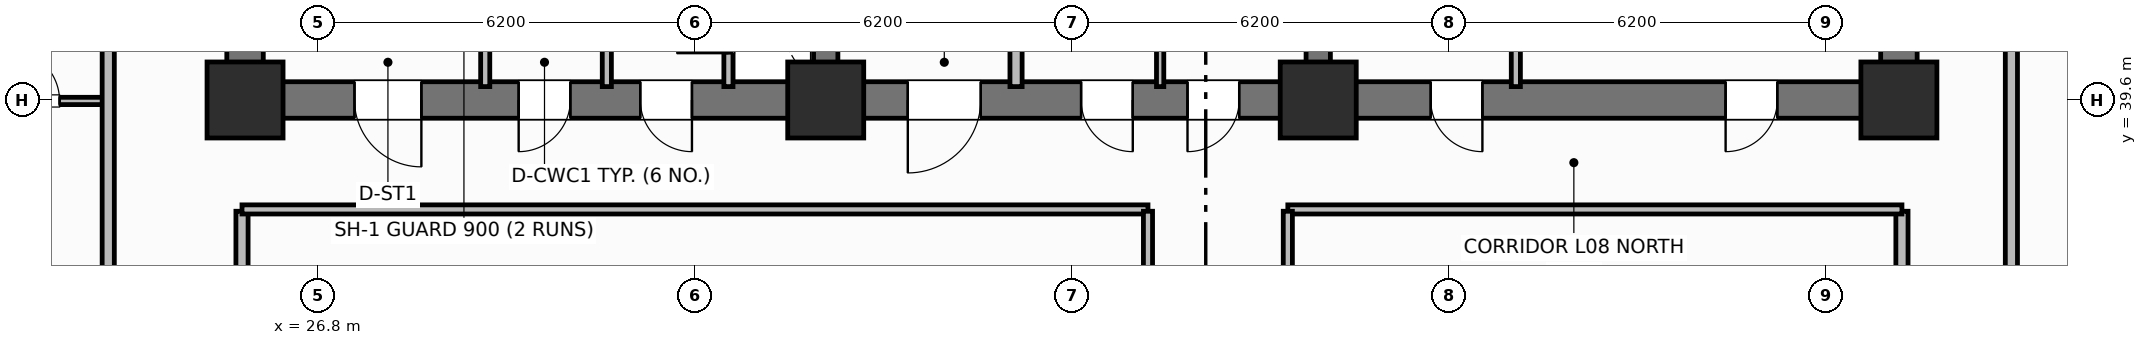
"""IFC4 building model, lengths in metres.
Left out: names, types, materials, properties, quantities, classifications, styles, units other than length and angle.
Written with IfcOpenShell. Run it as: python <this file> out.ifc"""

import sys

from ifc_helpers import new_model, si_unit, direction, frame, frame_2d, origin, origin_2d, place, context, subcontext, project, spatial, rectangle, extrude, element, fill, save


model = new_model("IFC4")
c1 = context("Model", 3, precision=1e-05, world=origin(), true_north=direction((0.0, 1.0)))
c2 = subcontext(c1, "Body", "Model", "MODEL_VIEW")
j1 = project(units=[si_unit("LENGTHUNIT", "METRE"), si_unit("PLANEANGLEUNIT", "RADIAN")], contexts=[c1])
p1 = place(None, origin())
s1 = spatial("IfcSite", under=j1, at=p1, CompositionType="ELEMENT")
p2 = place(p1, origin())
s2 = spatial("IfcBuilding", under=s1, at=p2, CompositionType="ELEMENT")
p3 = place(p2, frame((0.0, 0.0, 36.2)))
s3 = spatial("IfcBuildingStorey", under=s2, at=p3, CompositionType="ELEMENT", Elevation=36.2)
for number, where, z_axis, x_axis in (
    (1, (25.6, 39.9, 0.0), (0.0, 0.0, 1.0), (0.0, 1.0, 0.0)),
    (2, (52.8, 39.9, 0.0), (0.0, 0.0, 1.0), (0.0, 1.0, 0.0)),
):
    element("IfcWall", number, at=place(p3, frame(where, z_axis=z_axis, x_axis=x_axis)), inside=s3, PredefinedType="SHEAR", context=c2, shape_type="SweptSolid", body=[
        extrude(rectangle(XDim=5.6, YDim=0.6, at=frame_2d((2.8, 0.0))), origin(), (0.0, 0.0, 1.0), 3.7),
    ])
p4 = place(p3, frame((52.8, 39.6, 0.0), z_axis=(0.0, 0.0, 1.0), x_axis=(-1.0, 0.0, 0.0)))
e3 = element("IfcWall", 3, at=p4, inside=s3, PredefinedType="SHEAR", context=c2, shape_type="SweptSolid", body=[
    extrude(rectangle(XDim=27.2, YDim=0.6, at=frame_2d((13.6, 0.0))), origin(), (0.0, 0.0, 1.0), 3.7),
])
p5 = place(p4, frame((24.3, 0.0, 0.0)))
e4 = element("IfcOpeningElement", 4, at=p5, cuts=e3, PredefinedType="OPENING", context=c2, shape_type="SweptSolid", body=[
    extrude(rectangle(XDim=1.1, YDim=2.15, at=frame_2d((0.55, 1.075))), frame((0.0, 0.31, 0.0), z_axis=(0.0, -1.0, 0.0), x_axis=(1.0, 0.0, 0.0)), (0.0, 0.0, 1.0), 0.62),
])
p6 = place(p4, frame((21.85, 0.0, 0.0)))
e5 = element("IfcOpeningElement", 5, at=p6, cuts=e3, PredefinedType="OPENING", context=c2, shape_type="SweptSolid", body=[
    extrude(rectangle(XDim=0.85, YDim=2.1, at=frame_2d((0.425, 1.05))), frame((0.0, 0.31, 0.0), z_axis=(0.0, -1.0, 0.0), x_axis=(1.0, 0.0, 0.0)), (0.0, 0.0, 1.0), 0.62),
])
p7 = place(p4, frame((19.85, 0.0, 0.0)))
e6 = element("IfcOpeningElement", 6, at=p7, cuts=e3, PredefinedType="OPENING", context=c2, shape_type="SweptSolid", body=[
    extrude(rectangle(XDim=0.85, YDim=2.1, at=frame_2d((0.425, 1.05))), frame((0.0, 0.31, 0.0), z_axis=(0.0, -1.0, 0.0), x_axis=(1.0, 0.0, 0.0)), (0.0, 0.0, 1.0), 0.62),
])
p8 = place(p4, frame((15.1, 0.0, 0.0)))
e7 = element("IfcOpeningElement", 7, at=p8, cuts=e3, PredefinedType="OPENING", context=c2, shape_type="SweptSolid", body=[
    extrude(rectangle(XDim=1.2, YDim=2.15, at=frame_2d((0.6, 1.075))), frame((0.0, 0.31, 0.0), z_axis=(0.0, -1.0, 0.0), x_axis=(1.0, 0.0, 0.0)), (0.0, 0.0, 1.0), 0.62),
])
p9 = place(p4, frame((12.6, 0.0, 0.0)))
e8 = element("IfcOpeningElement", 8, at=p9, cuts=e3, PredefinedType="OPENING", context=c2, shape_type="SweptSolid", body=[
    extrude(rectangle(XDim=0.85, YDim=2.1, at=frame_2d((0.425, 1.05))), frame((0.0, 0.31, 0.0), z_axis=(0.0, -1.0, 0.0), x_axis=(1.0, 0.0, 0.0)), (0.0, 0.0, 1.0), 0.62),
])
p10 = place(p4, frame((10.85, 0.0, 0.0)))
e9 = element("IfcOpeningElement", 9, at=p10, cuts=e3, PredefinedType="OPENING", context=c2, shape_type="SweptSolid", body=[
    extrude(rectangle(XDim=0.85, YDim=2.1, at=frame_2d((0.425, 1.05))), frame((0.0, 0.31, 0.0), z_axis=(0.0, -1.0, 0.0), x_axis=(1.0, 0.0, 0.0)), (0.0, 0.0, 1.0), 0.62),
])
p11 = place(p4, frame((6.85, 0.0, 0.0)))
e10 = element("IfcOpeningElement", 10, at=p11, cuts=e3, PredefinedType="OPENING", context=c2, shape_type="SweptSolid", body=[
    extrude(rectangle(XDim=0.85, YDim=2.1, at=frame_2d((0.425, 1.05))), frame((0.0, 0.31, 0.0), z_axis=(0.0, -1.0, 0.0), x_axis=(1.0, 0.0, 0.0)), (0.0, 0.0, 1.0), 0.62),
])
p12 = place(p4, frame((2.0, 0.0, 0.0)))
e11 = element("IfcOpeningElement", 11, at=p12, cuts=e3, PredefinedType="OPENING", context=c2, shape_type="SweptSolid", body=[
    extrude(rectangle(XDim=0.85, YDim=2.1, at=frame_2d((0.425, 1.05))), frame((0.0, 0.31, 0.0), z_axis=(0.0, -1.0, 0.0), x_axis=(1.0, 0.0, 0.0)), (0.0, 0.0, 1.0), 0.62),
])
for number, where, z_axis, x_axis in (
    (12, (35.15, 39.9, 0.0), (0.0, 0.0, 1.0), (0.0, 1.0, 0.0)),
    (13, (43.25, 39.9, 0.0), (0.0, 0.0, 1.0), (0.0, 1.0, 0.0)),
):
    element("IfcWall", number, at=place(p3, frame(where, z_axis=z_axis, x_axis=x_axis)), inside=s3, PredefinedType="SHEAR", context=c2, shape_type="SweptSolid", body=[
        extrude(rectangle(XDim=5.6, YDim=0.4, at=frame_2d((2.8, 0.0))), origin(), (0.0, 0.0, 1.0), 3.7),
    ])
for number, where, z_axis, x_axis in (
    (14, (25.6, 39.6, 0.0), (0.0, 0.0, 1.0), (1.0, 0.0, 0.0)),
    (15, (35.15, 39.6, 0.0), (0.0, 0.0, 1.0), (1.0, 0.0, 0.0)),
    (16, (43.25, 39.6, 0.0), (0.0, 0.0, 1.0), (1.0, 0.0, 0.0)),
    (17, (52.8, 39.6, 0.0), (0.0, 0.0, 1.0), (1.0, 0.0, 0.0)),
):
    element("IfcColumn", number, at=place(p3, frame(where, z_axis=z_axis, x_axis=x_axis)), inside=s3, PredefinedType="COLUMN", context=c2, shape_type="SweptSolid", body=[
        extrude(rectangle(XDim=1.25, YDim=1.25, at=origin_2d()), origin(), (0.0, 0.0, 1.0), 3.7),
    ])
p13 = place(p3, frame((33.55, 39.82, 0.0), z_axis=(0.0, 0.0, 1.0), x_axis=(0.0, 1.0, 0.0)))
e18 = element("IfcWall", 18, at=p13, inside=s3, PredefinedType="PARTITIONING", context=c2, shape_type="SweptSolid", body=[
    extrude(rectangle(XDim=2.13, YDim=0.15, at=frame_2d((1.065, 0.0))), origin(), (0.0, 0.0, 1.0), 2.53),
])
p14 = place(p13, frame((0.55, 0.0, 0.0)))
e19 = element("IfcOpeningElement", 19, at=p14, cuts=e18, PredefinedType="OPENING", context=c2, shape_type="SweptSolid", body=[
    extrude(rectangle(XDim=0.85, YDim=2.05, at=frame_2d((0.425, 1.025))), frame((0.0, 0.085, 0.0), z_axis=(0.0, -1.0, 0.0), x_axis=(1.0, 0.0, 0.0)), (0.0, 0.0, 1.0), 0.17),
])
for number, where, z_axis, x_axis in (
    (20, (29.55, 39.82, 0.0), (0.0, 0.0, 1.0), (0.0, 1.0, 0.0)),
    (21, (31.55, 39.82, 0.0), (0.0, 0.0, 1.0), (0.0, 1.0, 0.0)),
):
    element("IfcWall", number, at=place(p3, frame(where, z_axis=z_axis, x_axis=x_axis)), inside=s3, PredefinedType="PARTITIONING", context=c2, shape_type="SweptSolid", body=[
        extrude(rectangle(XDim=2.13, YDim=0.15, at=frame_2d((1.065, 0.0))), origin(), (0.0, 0.0, 1.0), 2.53),
    ])
p15 = place(p3, frame((38.28, 39.82, 0.0), z_axis=(0.0, 0.0, 1.0), x_axis=(0.0, 1.0, 0.0)))
e22 = element("IfcWall", 22, at=p15, inside=s3, PredefinedType="PARTITIONING", context=c2, shape_type="SweptSolid", body=[
    extrude(rectangle(XDim=2.73, YDim=0.2, at=frame_2d((1.365, 0.0))), origin(), (0.0, 0.0, 1.0), 2.53),
])
p16 = place(p3, frame((40.65, 39.82, 0.0), z_axis=(0.0, 0.0, 1.0), x_axis=(0.0, 1.0, 0.0)))
e23 = element("IfcWall", 23, at=p16, inside=s3, PredefinedType="PARTITIONING", context=c2, shape_type="SweptSolid", body=[
    extrude(rectangle(XDim=2.73, YDim=0.12, at=frame_2d((1.365, 0.0))), origin(), (0.0, 0.0, 1.0), 2.53),
])
p17 = place(p3, frame((46.5, 39.82, 0.0), z_axis=(0.0, 0.0, 1.0), x_axis=(0.0, 1.0, 0.0)))
e24 = element("IfcWall", 24, at=p17, inside=s3, PredefinedType="PARTITIONING", context=c2, shape_type="SweptSolid", body=[
    extrude(rectangle(XDim=2.73, YDim=0.15, at=frame_2d((1.365, 0.0))), origin(), (0.0, 0.0, 1.0), 2.53),
])
for number, where, z_axis, x_axis in (
    (25, (25.55, 18.63, 0.0), (0.0, 0.0, 1.0), (0.0, 1.0, 0.0)),
    (26, (52.85, 18.63, 0.0), (0.0, 0.0, 1.0), (0.0, 1.0, 0.0)),
):
    element("IfcWall", number, at=place(p3, frame(where, z_axis=z_axis, x_axis=x_axis)), inside=s3, PredefinedType="PARTITIONING", context=c2, shape_type="SweptSolid", body=[
        extrude(rectangle(XDim=19.14, YDim=0.2, at=frame_2d((9.57, 0.0))), origin(), (0.0, 0.0, 1.0), 2.53),
    ])
p18 = place(p3, frame((25.55, 37.8, 0.0), z_axis=(0.0, 0.0, 1.0), x_axis=(1.0, 0.0, 0.0)))
e27 = element("IfcWall", 27, at=p18, inside=s3, PredefinedType="PARTITIONING", context=c2, shape_type="SweptSolid", body=[
    extrude(rectangle(XDim=14.9, YDim=0.15, at=frame_2d((7.45, 0.0))), origin(), (0.0, 0.0, 1.0), 2.53),
])
p19 = place(p3, frame((42.75, 37.8, 0.0), z_axis=(0.0, 0.0, 1.0), x_axis=(1.0, 0.0, 0.0)))
e28 = element("IfcWall", 28, at=p19, inside=s3, PredefinedType="PARTITIONING", context=c2, shape_type="SweptSolid", body=[
    extrude(rectangle(XDim=10.1, YDim=0.15, at=frame_2d((5.05, 0.0))), origin(), (0.0, 0.0, 1.0), 2.53),
])
p20 = place(p3, frame((40.45, 18.63, 0.0), z_axis=(0.0, 0.0, 1.0), x_axis=(0.0, 1.0, 0.0)))
e29 = element("IfcWall", 29, at=p20, inside=s3, PredefinedType="PARTITIONING", context=c2, shape_type="SweptSolid", body=[
    extrude(rectangle(XDim=19.14, YDim=0.15, at=frame_2d((9.57, 0.0))), origin(), (0.0, 0.0, 1.0), 2.53),
])
p21 = place(p20, frame((2.4, 0.0, 0.0)))
e30 = element("IfcOpeningElement", 30, at=p21, cuts=e29, PredefinedType="OPENING", context=c2, shape_type="SweptSolid", body=[
    extrude(rectangle(XDim=1.0, YDim=2.15, at=frame_2d((0.5, 1.075))), frame((0.0, 0.085, 0.0), z_axis=(0.0, -1.0, 0.0), x_axis=(1.0, 0.0, 0.0)), (0.0, 0.0, 1.0), 0.17),
])
p22 = place(p20, frame((11.4, 0.0, 0.0)))
e31 = element("IfcOpeningElement", 31, at=p22, cuts=e29, PredefinedType="OPENING", context=c2, shape_type="SweptSolid", body=[
    extrude(rectangle(XDim=1.0, YDim=2.15, at=frame_2d((0.5, 1.075))), frame((0.0, 0.085, 0.0), z_axis=(0.0, -1.0, 0.0), x_axis=(1.0, 0.0, 0.0)), (0.0, 0.0, 1.0), 0.17),
])
p23 = place(p3, frame((42.75, 18.63, 0.0), z_axis=(0.0, 0.0, 1.0), x_axis=(0.0, 1.0, 0.0)))
e32 = element("IfcWall", 32, at=p23, inside=s3, PredefinedType="PARTITIONING", context=c2, shape_type="SweptSolid", body=[
    extrude(rectangle(XDim=19.14, YDim=0.15, at=frame_2d((9.57, 0.0))), origin(), (0.0, 0.0, 1.0), 2.53),
])
p24 = place(p23, frame((5.5, 0.0, 0.0)))
e33 = element("IfcOpeningElement", 33, at=p24, cuts=e32, PredefinedType="OPENING", context=c2, shape_type="SweptSolid", body=[
    extrude(rectangle(XDim=1.0, YDim=2.15, at=frame_2d((0.5, 1.075))), frame((0.0, 0.085, 0.0), z_axis=(0.0, -1.0, 0.0), x_axis=(1.0, 0.0, 0.0)), (0.0, 0.0, 1.0), 0.17),
])
p25 = place(p3, frame((21.1, 39.584, 0.0), z_axis=(0.0, 0.0, 1.0), x_axis=(1.0, 0.0, 0.0)))
e34 = element("IfcWall", 34, at=p25, inside=s3, PredefinedType="PARTITIONING", context=c2, shape_type="SweptSolid", body=[
    extrude(rectangle(XDim=2.25, YDim=0.12, at=frame_2d((1.125, 0.0))), origin(), (0.0, 0.0, 1.0), 2.53),
])
p26 = place(p25, frame((0.6, 0.0, 0.0)))
e35 = element("IfcOpeningElement", 35, at=p26, cuts=e34, PredefinedType="OPENING", context=c2, shape_type="SweptSolid", body=[
    extrude(rectangle(XDim=0.85, YDim=2.1, at=frame_2d((0.425, 1.05))), frame((0.0, 0.07, 0.0), z_axis=(0.0, -1.0, 0.0), x_axis=(1.0, 0.0, 0.0)), (0.0, 0.0, 1.0), 0.14),
])
p27 = place(p3, frame((23.35, 10.6, 0.0), z_axis=(0.0, 0.0, 1.0), x_axis=(0.0, 1.0, 0.0)))
e36 = element("IfcWall", 36, at=p27, inside=s3, PredefinedType="PARTITIONING", context=c2, shape_type="SweptSolid", body=[
    extrude(rectangle(XDim=35.2, YDim=0.2, at=frame_2d((17.6, 0.0))), origin(), (0.0, 0.0, 1.0), 2.53),
])
p28 = place(p27, frame((2.65, 0.0, 0.0)))
e37 = element("IfcOpeningElement", 37, at=p28, cuts=e36, PredefinedType="OPENING", context=c2, shape_type="SweptSolid", body=[
    extrude(rectangle(XDim=1.0, YDim=2.15, at=frame_2d((0.5, 1.075))), frame((0.0, 0.11, 0.0), z_axis=(0.0, -1.0, 0.0), x_axis=(1.0, 0.0, 0.0)), (0.0, 0.0, 1.0), 0.22),
])
p29 = place(p27, frame((12.65, 0.0, 0.0)))
e38 = element("IfcOpeningElement", 38, at=p29, cuts=e36, PredefinedType="OPENING", context=c2, shape_type="SweptSolid", body=[
    extrude(rectangle(XDim=1.0, YDim=2.15, at=frame_2d((0.5, 1.075))), frame((0.0, 0.11, 0.0), z_axis=(0.0, -1.0, 0.0), x_axis=(1.0, 0.0, 0.0)), (0.0, 0.0, 1.0), 0.22),
])
p30 = place(p27, frame((24.134, 0.0, 0.0)))
e39 = element("IfcOpeningElement", 39, at=p30, cuts=e36, PredefinedType="OPENING", context=c2, shape_type="SweptSolid", body=[
    extrude(rectangle(XDim=1.0, YDim=2.15, at=frame_2d((0.5, 1.075))), frame((0.0, 0.11, 0.0), z_axis=(0.0, -1.0, 0.0), x_axis=(1.0, 0.0, 0.0)), (0.0, 0.0, 1.0), 0.22),
])
p31 = place(p3, frame((54.65, 10.6, 0.0), z_axis=(0.0, 0.0, 1.0), x_axis=(0.0, 1.0, 0.0)))
e40 = element("IfcWall", 40, at=p31, inside=s3, PredefinedType="PARTITIONING", context=c2, shape_type="SweptSolid", body=[
    extrude(rectangle(XDim=35.2, YDim=0.2, at=frame_2d((17.6, 0.0))), origin(), (0.0, 0.0, 1.0), 2.53),
])
p32 = place(p31, frame((2.65, 0.0, 0.0)))
e41 = element("IfcOpeningElement", 41, at=p32, cuts=e40, PredefinedType="OPENING", context=c2, shape_type="SweptSolid", body=[
    extrude(rectangle(XDim=1.0, YDim=2.15, at=frame_2d((0.5, 1.075))), frame((0.0, 0.11, 0.0), z_axis=(0.0, -1.0, 0.0), x_axis=(1.0, 0.0, 0.0)), (0.0, 0.0, 1.0), 0.22),
])
p33 = place(p31, frame((19.95, 0.0, 0.0)))
e42 = element("IfcOpeningElement", 42, at=p33, cuts=e40, PredefinedType="OPENING", context=c2, shape_type="SweptSolid", body=[
    extrude(rectangle(XDim=1.0, YDim=2.15, at=frame_2d((0.5, 1.075))), frame((0.0, 0.11, 0.0), z_axis=(0.0, -1.0, 0.0), x_axis=(1.0, 0.0, 0.0)), (0.0, 0.0, 1.0), 0.22),
])
p34 = place(p14, origin())
e43 = element("IfcDoor", 43, at=p34, inside=s3, OperationType="SINGLE_SWING_LEFT", PredefinedType="TRAPDOOR", context=c2, shape_type="SweptSolid", body=[
    extrude(rectangle(XDim=0.85, YDim=2.05, at=frame_2d((0.425, 1.025))), frame((0.0, 0.025, 0.0), z_axis=(0.0, -1.0, 0.0), x_axis=(1.0, 0.0, 0.0)), (0.0, 0.0, 1.0), 0.05),
])
fill(e19, e43)
p35 = place(p26, origin())
e44 = element("IfcDoor", 44, at=p35, inside=s3, OperationType="SINGLE_SWING_LEFT", PredefinedType="DOOR", context=c2, shape_type="SweptSolid", body=[
    extrude(rectangle(XDim=0.85, YDim=2.1, at=frame_2d((0.425, 1.05))), frame((0.0, 0.025, 0.0), z_axis=(0.0, -1.0, 0.0), x_axis=(1.0, 0.0, 0.0)), (0.0, 0.0, 1.0), 0.05),
])
fill(e35, e44)
p36 = place(p5, origin())
e45 = element("IfcDoor", 45, at=p36, inside=s3, OperationType="SINGLE_SWING_LEFT", PredefinedType="DOOR", context=c2, shape_type="SweptSolid", body=[
    extrude(rectangle(XDim=1.1, YDim=2.15, at=frame_2d((0.55, 1.075))), frame((0.0, 0.025, 0.0), z_axis=(0.0, -1.0, 0.0), x_axis=(1.0, 0.0, 0.0)), (0.0, 0.0, 1.0), 0.05),
])
fill(e4, e45)
p37 = place(p6, origin())
e46 = element("IfcDoor", 46, at=p37, inside=s3, OperationType="SINGLE_SWING_RIGHT", PredefinedType="DOOR", context=c2, shape_type="SweptSolid", body=[
    extrude(rectangle(XDim=0.85, YDim=2.1, at=frame_2d((0.425, 1.05))), frame((0.0, 0.025, 0.0), z_axis=(0.0, -1.0, 0.0), x_axis=(1.0, 0.0, 0.0)), (0.0, 0.0, 1.0), 0.05),
])
fill(e5, e46)
p38 = place(p7, origin())
e47 = element("IfcDoor", 47, at=p38, inside=s3, OperationType="SINGLE_SWING_LEFT", PredefinedType="DOOR", context=c2, shape_type="SweptSolid", body=[
    extrude(rectangle(XDim=0.85, YDim=2.1, at=frame_2d((0.425, 1.05))), frame((0.0, 0.025, 0.0), z_axis=(0.0, -1.0, 0.0), x_axis=(1.0, 0.0, 0.0)), (0.0, 0.0, 1.0), 0.05),
])
fill(e6, e47)
p39 = place(p8, origin())
e48 = element("IfcDoor", 48, at=p39, inside=s3, OperationType="SINGLE_SWING_RIGHT", PredefinedType="DOOR", context=c2, shape_type="SweptSolid", body=[
    extrude(rectangle(XDim=1.2, YDim=2.15, at=frame_2d((0.6, 1.075))), frame((0.0, 0.025, 0.0), z_axis=(0.0, -1.0, 0.0), x_axis=(1.0, 0.0, 0.0)), (0.0, 0.0, 1.0), 0.05),
])
fill(e7, e48)
p40 = place(p9, origin())
e49 = element("IfcDoor", 49, at=p40, inside=s3, OperationType="SINGLE_SWING_LEFT", PredefinedType="DOOR", context=c2, shape_type="SweptSolid", body=[
    extrude(rectangle(XDim=0.85, YDim=2.1, at=frame_2d((0.425, 1.05))), frame((0.0, 0.025, 0.0), z_axis=(0.0, -1.0, 0.0), x_axis=(1.0, 0.0, 0.0)), (0.0, 0.0, 1.0), 0.05),
])
fill(e8, e49)
p41 = place(p10, origin())
e50 = element("IfcDoor", 50, at=p41, inside=s3, OperationType="SINGLE_SWING_RIGHT", PredefinedType="DOOR", context=c2, shape_type="SweptSolid", body=[
    extrude(rectangle(XDim=0.85, YDim=2.1, at=frame_2d((0.425, 1.05))), frame((0.0, 0.025, 0.0), z_axis=(0.0, -1.0, 0.0), x_axis=(1.0, 0.0, 0.0)), (0.0, 0.0, 1.0), 0.05),
])
fill(e9, e50)
p42 = place(p11, origin())
e51 = element("IfcDoor", 51, at=p42, inside=s3, OperationType="SINGLE_SWING_LEFT", PredefinedType="DOOR", context=c2, shape_type="SweptSolid", body=[
    extrude(rectangle(XDim=0.85, YDim=2.1, at=frame_2d((0.425, 1.05))), frame((0.0, 0.025, 0.0), z_axis=(0.0, -1.0, 0.0), x_axis=(1.0, 0.0, 0.0)), (0.0, 0.0, 1.0), 0.05),
])
fill(e10, e51)
p43 = place(p12, origin())
e52 = element("IfcDoor", 52, at=p43, inside=s3, OperationType="SINGLE_SWING_RIGHT", PredefinedType="DOOR", context=c2, shape_type="SweptSolid", body=[
    extrude(rectangle(XDim=0.85, YDim=2.1, at=frame_2d((0.425, 1.05))), frame((0.0, 0.025, 0.0), z_axis=(0.0, -1.0, 0.0), x_axis=(1.0, 0.0, 0.0)), (0.0, 0.0, 1.0), 0.05),
])
fill(e11, e52)
save(model, sys.argv[1])
